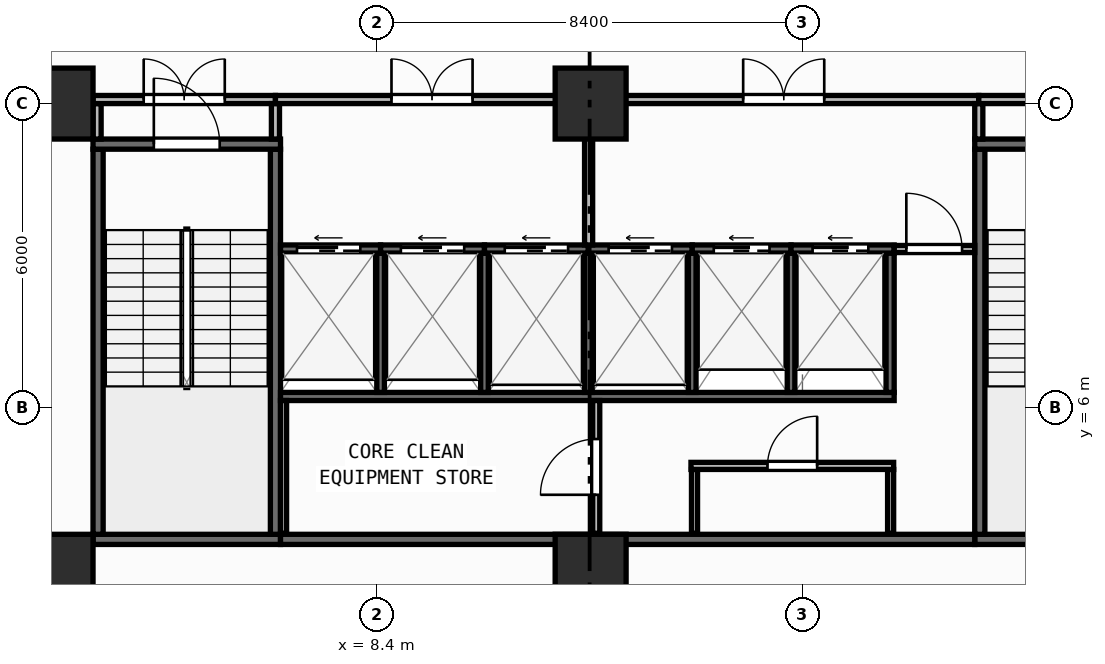
"""IFC4 building model, lengths in metres.
Left out: names, types, materials, properties, quantities, classifications, styles, units other than length and angle.
Written with IfcOpenShell. Run it as: python <this file> out.ifc"""

import sys

from ifc_helpers import new_model, si_unit, direction, frame, frame_2d, origin, origin_2d, place, context, subcontext, project, spatial, rectangle, extrude, element, fill, save


model = new_model("IFC4")
c1 = context("Model", 3, precision=1e-05, world=origin(), true_north=direction((0.0, 1.0)))
c2 = subcontext(c1, "Body", "Model", "MODEL_VIEW")
j1 = project(units=[si_unit("LENGTHUNIT", "METRE"), si_unit("PLANEANGLEUNIT", "RADIAN")], contexts=[c1])
p1 = place(None, origin())
s1 = spatial("IfcSite", under=j1, at=p1, CompositionType="ELEMENT")
p2 = place(p1, origin())
s2 = spatial("IfcBuilding", under=s1, at=p2, CompositionType="ELEMENT")
p3 = place(p2, origin())
s3 = spatial("IfcBuildingStorey", under=s2, at=p3, CompositionType="ELEMENT", Elevation=0.0)
for number, where, z_axis, x_axis in (
    (1, (2.1, 2.8, 0.0), (0.0, 0.0, 1.0), (1.0, 0.0, 0.0)),
    (2, (12.62, 2.8, 0.0), (0.0, 0.0, 1.0), (1.0, 0.0, 0.0)),
    (3, (2.1, 12.0, 0.0), (0.0, 0.0, 1.0), (1.0, 0.0, 0.0)),
    (4, (12.62, 12.0, 0.0), (0.0, 0.0, 1.0), (1.0, 0.0, 0.0)),
):
    element("IfcColumn", number, at=place(p3, frame(where, z_axis=z_axis, x_axis=x_axis)), inside=s3, PredefinedType="COLUMN", context=c2, shape_type="SweptSolid", body=[
        extrude(rectangle(XDim=1.4, YDim=1.4, at=origin_2d()), origin(), (0.0, 0.0, 1.0), 4.5),
    ])
p4 = place(p3, frame((2.8, 3.4, 0.0), z_axis=(0.0, 0.0, 1.0), x_axis=(1.0, 0.0, 0.0)))
e5 = element("IfcWall", 5, at=p4, inside=s3, PredefinedType="SHEAR", context=c2, shape_type="SweptSolid", body=[
    extrude(rectangle(XDim=3.7, YDim=0.2, at=frame_2d((1.85, 0.0))), origin(), (0.0, 0.0, 1.0), 4.25),
])
for number, where, z_axis, x_axis in (
    (6, (2.9, 3.5, 0.0), (0.0, 0.0, 1.0), (0.0, 1.0, 0.0)),
    (7, (6.4, 3.5, 0.0), (0.0, 0.0, 1.0), (0.0, 1.0, 0.0)),
):
    element("IfcWall", number, at=place(p3, frame(where, z_axis=z_axis, x_axis=x_axis)), inside=s3, PredefinedType="SHEAR", context=c2, shape_type="SweptSolid", body=[
        extrude(rectangle(XDim=7.6, YDim=0.2, at=frame_2d((3.8, 0.0))), origin(), (0.0, 0.0, 1.0), 4.25),
    ])
p5 = place(p3, frame((2.8, 11.2, 0.0), z_axis=(0.0, 0.0, 1.0), x_axis=(1.0, 0.0, 0.0)))
e8 = element("IfcWall", 8, at=p5, inside=s3, PredefinedType="SHEAR", context=c2, shape_type="SweptSolid", body=[
    extrude(rectangle(XDim=3.7, YDim=0.2, at=frame_2d((1.85, 0.0))), origin(), (0.0, 0.0, 1.0), 4.25),
])
p6 = place(p5, frame((1.2, 0.0, 0.0)))
e9 = element("IfcOpeningElement", 9, at=p6, cuts=e8, PredefinedType="OPENING", context=c2, shape_type="SweptSolid", body=[
    extrude(rectangle(XDim=1.3, YDim=2.15, at=frame_2d((0.65, 1.075))), frame((0.0, 0.11, 0.0), z_axis=(0.0, -1.0, 0.0), x_axis=(1.0, 0.0, 0.0)), (0.0, 0.0, 1.0), 0.22),
])
p7 = place(p3, frame((20.2, 3.4, 0.0), z_axis=(0.0, 0.0, 1.0), x_axis=(1.0, 0.0, 0.0)))
e10 = element("IfcWall", 10, at=p7, inside=s3, PredefinedType="SHEAR", context=c2, shape_type="SweptSolid", body=[
    extrude(rectangle(XDim=3.7, YDim=0.2, at=frame_2d((1.85, 0.0))), origin(), (0.0, 0.0, 1.0), 4.25),
])
p8 = place(p3, frame((20.3, 3.5, 0.0), z_axis=(0.0, 0.0, 1.0), x_axis=(0.0, 1.0, 0.0)))
e11 = element("IfcWall", 11, at=p8, inside=s3, PredefinedType="SHEAR", context=c2, shape_type="SweptSolid", body=[
    extrude(rectangle(XDim=7.6, YDim=0.2, at=frame_2d((3.8, 0.0))), origin(), (0.0, 0.0, 1.0), 4.25),
])
p9 = place(p3, frame((20.2, 11.2, 0.0), z_axis=(0.0, 0.0, 1.0), x_axis=(1.0, 0.0, 0.0)))
e12 = element("IfcWall", 12, at=p9, inside=s3, PredefinedType="SHEAR", context=c2, shape_type="SweptSolid", body=[
    extrude(rectangle(XDim=3.7, YDim=0.2, at=frame_2d((1.85, 0.0))), origin(), (0.0, 0.0, 1.0), 4.25),
])
p10 = place(p9, frame((1.2, 0.0, 0.0)))
e13 = element("IfcOpeningElement", 13, at=p10, cuts=e12, PredefinedType="OPENING", context=c2, shape_type="SweptSolid", body=[
    extrude(rectangle(XDim=1.3, YDim=2.15, at=frame_2d((0.65, 1.075))), frame((0.0, 0.11, 0.0), z_axis=(0.0, -1.0, 0.0), x_axis=(1.0, 0.0, 0.0)), (0.0, 0.0, 1.0), 0.22),
])
p11 = place(p3, frame((6.5, 3.4, 0.0), z_axis=(0.0, 0.0, 1.0), x_axis=(1.0, 0.0, 0.0)))
e14 = element("IfcWall", 14, at=p11, inside=s3, PredefinedType="SHEAR", context=c2, shape_type="SweptSolid", body=[
    extrude(rectangle(XDim=13.7, YDim=0.2, at=frame_2d((6.85, 0.0))), origin(), (0.0, 0.0, 1.0), 4.25),
])
p12 = place(p3, frame((6.5, 6.22, 0.0), z_axis=(0.0, 0.0, 1.0), x_axis=(1.0, 0.0, 0.0)))
e15 = element("IfcWall", 15, at=p12, inside=s3, PredefinedType="SHEAR", context=c2, shape_type="SweptSolid", body=[
    extrude(rectangle(XDim=12.11, YDim=0.16, at=frame_2d((6.055, 0.0))), origin(), (0.0, 0.0, 1.0), 4.25),
])
p13 = place(p3, frame((18.53, 6.3, 0.0), z_axis=(0.0, 0.0, 1.0), x_axis=(0.0, 1.0, 0.0)))
e16 = element("IfcWall", 16, at=p13, inside=s3, PredefinedType="SHEAR", context=c2, shape_type="SweptSolid", body=[
    extrude(rectangle(XDim=2.75, YDim=0.16, at=frame_2d((1.375, 0.0))), origin(), (0.0, 0.0, 1.0), 4.25),
])
for number, where, z_axis, x_axis in (
    (17, (8.475, 6.3, 0.0), (0.0, 0.0, 1.0), (0.0, 1.0, 0.0)),
    (18, (10.525, 6.3, 0.0), (0.0, 0.0, 1.0), (0.0, 1.0, 0.0)),
    (19, (12.575, 6.3, 0.0), (0.0, 0.0, 1.0), (0.0, 1.0, 0.0)),
    (20, (14.625, 6.3, 0.0), (0.0, 0.0, 1.0), (0.0, 1.0, 0.0)),
    (21, (16.575, 6.3, 0.0), (0.0, 0.0, 1.0), (0.0, 1.0, 0.0)),
):
    element("IfcWall", number, at=place(p3, frame(where, z_axis=z_axis, x_axis=x_axis)), inside=s3, PredefinedType="SHEAR", context=c2, shape_type="SweptSolid", body=[
        extrude(rectangle(XDim=2.75, YDim=0.15, at=frame_2d((1.375, 0.0))), origin(), (0.0, 0.0, 1.0), 4.25),
    ])
p14 = place(p3, frame((6.5, 9.13, 0.0), z_axis=(0.0, 0.0, 1.0), x_axis=(1.0, 0.0, 0.0)))
e22 = element("IfcWall", 22, at=p14, inside=s3, PredefinedType="SHEAR", context=c2, shape_type="SweptSolid", body=[
    extrude(rectangle(XDim=1.975, YDim=0.16, at=frame_2d((0.988, 0.0))), origin(), (0.0, 0.0, 1.0), 4.25),
])
p15 = place(p14, frame((0.325, 0.0, 0.0)))
e23 = element("IfcOpeningElement", 23, at=p15, cuts=e22, PredefinedType="OPENING", context=c2, shape_type="SweptSolid", body=[
    extrude(rectangle(XDim=1.25, YDim=2.15, at=frame_2d((0.625, 1.075))), frame((0.0, 0.09, 0.0), z_axis=(0.0, -1.0, 0.0), x_axis=(1.0, 0.0, 0.0)), (0.0, 0.0, 1.0), 0.18),
])
p16 = place(p3, frame((8.475, 9.13, 0.0), z_axis=(0.0, 0.0, 1.0), x_axis=(1.0, 0.0, 0.0)))
e24 = element("IfcWall", 24, at=p16, inside=s3, PredefinedType="SHEAR", context=c2, shape_type="SweptSolid", body=[
    extrude(rectangle(XDim=2.05, YDim=0.16, at=frame_2d((1.025, 0.0))), origin(), (0.0, 0.0, 1.0), 4.25),
])
p17 = place(p16, frame((0.4, 0.0, 0.0)))
e25 = element("IfcOpeningElement", 25, at=p17, cuts=e24, PredefinedType="OPENING", context=c2, shape_type="SweptSolid", body=[
    extrude(rectangle(XDim=1.25, YDim=2.15, at=frame_2d((0.625, 1.075))), frame((0.0, 0.09, 0.0), z_axis=(0.0, -1.0, 0.0), x_axis=(1.0, 0.0, 0.0)), (0.0, 0.0, 1.0), 0.18),
])
p18 = place(p3, frame((10.525, 9.13, 0.0), z_axis=(0.0, 0.0, 1.0), x_axis=(1.0, 0.0, 0.0)))
e26 = element("IfcWall", 26, at=p18, inside=s3, PredefinedType="SHEAR", context=c2, shape_type="SweptSolid", body=[
    extrude(rectangle(XDim=2.05, YDim=0.16, at=frame_2d((1.025, 0.0))), origin(), (0.0, 0.0, 1.0), 4.25),
])
p19 = place(p18, frame((0.4, 0.0, 0.0)))
e27 = element("IfcOpeningElement", 27, at=p19, cuts=e26, PredefinedType="OPENING", context=c2, shape_type="SweptSolid", body=[
    extrude(rectangle(XDim=1.25, YDim=2.15, at=frame_2d((0.625, 1.075))), frame((0.0, 0.09, 0.0), z_axis=(0.0, -1.0, 0.0), x_axis=(1.0, 0.0, 0.0)), (0.0, 0.0, 1.0), 0.18),
])
p20 = place(p3, frame((12.575, 9.13, 0.0), z_axis=(0.0, 0.0, 1.0), x_axis=(1.0, 0.0, 0.0)))
e28 = element("IfcWall", 28, at=p20, inside=s3, PredefinedType="SHEAR", context=c2, shape_type="SweptSolid", body=[
    extrude(rectangle(XDim=2.05, YDim=0.16, at=frame_2d((1.025, 0.0))), origin(), (0.0, 0.0, 1.0), 4.25),
])
p21 = place(p20, frame((0.4, 0.0, 0.0)))
e29 = element("IfcOpeningElement", 29, at=p21, cuts=e28, PredefinedType="OPENING", context=c2, shape_type="SweptSolid", body=[
    extrude(rectangle(XDim=1.25, YDim=2.15, at=frame_2d((0.625, 1.075))), frame((0.0, 0.09, 0.0), z_axis=(0.0, -1.0, 0.0), x_axis=(1.0, 0.0, 0.0)), (0.0, 0.0, 1.0), 0.18),
])
p22 = place(p3, frame((14.625, 9.13, 0.0), z_axis=(0.0, 0.0, 1.0), x_axis=(1.0, 0.0, 0.0)))
e30 = element("IfcWall", 30, at=p22, inside=s3, PredefinedType="SHEAR", context=c2, shape_type="SweptSolid", body=[
    extrude(rectangle(XDim=1.95, YDim=0.16, at=frame_2d((0.975, 0.0))), origin(), (0.0, 0.0, 1.0), 4.25),
])
p23 = place(p22, frame((0.425, 0.0, 0.0)))
e31 = element("IfcOpeningElement", 31, at=p23, cuts=e30, PredefinedType="OPENING", context=c2, shape_type="SweptSolid", body=[
    extrude(rectangle(XDim=1.1, YDim=2.15, at=frame_2d((0.55, 1.075))), frame((0.0, 0.09, 0.0), z_axis=(0.0, -1.0, 0.0), x_axis=(1.0, 0.0, 0.0)), (0.0, 0.0, 1.0), 0.18),
])
p24 = place(p3, frame((16.575, 9.13, 0.0), z_axis=(0.0, 0.0, 1.0), x_axis=(1.0, 0.0, 0.0)))
e32 = element("IfcWall", 32, at=p24, inside=s3, PredefinedType="SHEAR", context=c2, shape_type="SweptSolid", body=[
    extrude(rectangle(XDim=2.035, YDim=0.16, at=frame_2d((1.018, 0.0))), origin(), (0.0, 0.0, 1.0), 4.25),
])
p25 = place(p24, frame((0.425, 0.0, 0.0)))
e33 = element("IfcOpeningElement", 33, at=p25, cuts=e32, PredefinedType="OPENING", context=c2, shape_type="SweptSolid", body=[
    extrude(rectangle(XDim=1.1, YDim=2.15, at=frame_2d((0.55, 1.075))), frame((0.0, 0.09, 0.0), z_axis=(0.0, -1.0, 0.0), x_axis=(1.0, 0.0, 0.0)), (0.0, 0.0, 1.0), 0.18),
])
p26 = place(p3, frame((6.56, 3.52, 0.0), z_axis=(0.0, 0.0, 1.0), x_axis=(0.0, 1.0, 0.0)))
e34 = element("IfcWall", 34, at=p26, inside=s3, PredefinedType="PARTITIONING", context=c2, shape_type="SweptSolid", body=[
    extrude(rectangle(XDim=2.62, YDim=0.12, at=frame_2d((1.31, 0.0))), origin(), (0.0, 0.0, 1.0), 4.25),
])
p27 = place(p3, frame((12.73, 3.52, 0.0), z_axis=(0.0, 0.0, 1.0), x_axis=(0.0, 1.0, 0.0)))
e35 = element("IfcWall", 35, at=p27, inside=s3, PredefinedType="PARTITIONING", context=c2, shape_type="SweptSolid", body=[
    extrude(rectangle(XDim=2.62, YDim=0.14, at=frame_2d((1.31, 0.0))), origin(), (0.0, 0.0, 1.0), 4.25),
])
p28 = place(p27, frame((0.76, 0.0, 0.0)))
e36 = element("IfcOpeningElement", 36, at=p28, cuts=e35, PredefinedType="OPENING", context=c2, shape_type="SweptSolid", body=[
    extrude(rectangle(XDim=1.1, YDim=2.1, at=frame_2d((0.55, 1.05))), frame((0.0, 0.08, 0.0), z_axis=(0.0, -1.0, 0.0), x_axis=(1.0, 0.0, 0.0)), (0.0, 0.0, 1.0), 0.16),
])
for number, where, z_axis, x_axis in (
    (37, (14.67, 3.52, 0.0), (0.0, 0.0, 1.0), (0.0, 1.0, 0.0)),
    (38, (18.54, 3.52, 0.0), (0.0, 0.0, 1.0), (0.0, 1.0, 0.0)),
):
    element("IfcWall", number, at=place(p3, frame(where, z_axis=z_axis, x_axis=x_axis)), inside=s3, PredefinedType="PARTITIONING", context=c2, shape_type="SweptSolid", body=[
        extrude(rectangle(XDim=1.26, YDim=0.12, at=frame_2d((0.63, 0.0))), origin(), (0.0, 0.0, 1.0), 4.25),
    ])
p29 = place(p3, frame((14.6, 4.85, 0.0), z_axis=(0.0, 0.0, 1.0), x_axis=(1.0, 0.0, 0.0)))
e39 = element("IfcWall", 39, at=p29, inside=s3, PredefinedType="PARTITIONING", context=c2, shape_type="SweptSolid", body=[
    extrude(rectangle(XDim=4.0, YDim=0.14, at=frame_2d((2.0, 0.0))), origin(), (0.0, 0.0, 1.0), 4.25),
])
p30 = place(p29, frame((1.51, 0.0, 0.0)))
e40 = element("IfcOpeningElement", 40, at=p30, cuts=e39, PredefinedType="OPENING", context=c2, shape_type="SweptSolid", body=[
    extrude(rectangle(XDim=0.98, YDim=2.1, at=frame_2d((0.49, 1.05))), frame((0.0, 0.08, 0.0), z_axis=(0.0, -1.0, 0.0), x_axis=(1.0, 0.0, 0.0)), (0.0, 0.0, 1.0), 0.16),
])
p31 = place(p3, frame((18.61, 9.13, 0.0), z_axis=(0.0, 0.0, 1.0), x_axis=(1.0, 0.0, 0.0)))
e41 = element("IfcWall", 41, at=p31, inside=s3, PredefinedType="PARTITIONING", context=c2, shape_type="SweptSolid", body=[
    extrude(rectangle(XDim=1.59, YDim=0.14, at=frame_2d((0.795, 0.0))), origin(), (0.0, 0.0, 1.0), 4.25),
])
p32 = place(p31, frame((0.24, 0.0, 0.0)))
e42 = element("IfcOpeningElement", 42, at=p32, cuts=e41, PredefinedType="OPENING", context=c2, shape_type="SweptSolid", body=[
    extrude(rectangle(XDim=1.1, YDim=2.1, at=frame_2d((0.55, 1.05))), frame((0.0, 0.08, 0.0), z_axis=(0.0, -1.0, 0.0), x_axis=(1.0, 0.0, 0.0)), (0.0, 0.0, 1.0), 0.16),
])
p33 = place(p3, frame((2.88, 11.3, 0.0), z_axis=(0.0, 0.0, 1.0), x_axis=(0.0, 1.0, 0.0)))
e43 = element("IfcWall", 43, at=p33, inside=s3, PredefinedType="PARTITIONING", context=c2, shape_type="SweptSolid", body=[
    extrude(rectangle(XDim=0.7, YDim=0.16, at=frame_2d((0.35, 0.0))), origin(), (0.0, 0.0, 1.0), 4.25),
])
p34 = place(p3, frame((2.8, 12.08, 0.0), z_axis=(0.0, 0.0, 1.0), x_axis=(1.0, 0.0, 0.0)))
e44 = element("IfcWall", 44, at=p34, inside=s3, PredefinedType="PARTITIONING", context=c2, shape_type="SweptSolid", body=[
    extrude(rectangle(XDim=3.6, YDim=0.16, at=frame_2d((1.8, 0.0))), origin(), (0.0, 0.0, 1.0), 3.425),
])
p35 = place(p34, frame((1.0, 0.0, 0.0)))
e45 = element("IfcOpeningElement", 45, at=p35, cuts=e44, PredefinedType="OPENING", context=c2, shape_type="SweptSolid", body=[
    extrude(rectangle(XDim=1.6, YDim=2.05, at=frame_2d((0.8, 1.025))), frame((0.0, 0.09, 0.0), z_axis=(0.0, -1.0, 0.0), x_axis=(1.0, 0.0, 0.0)), (0.0, 0.0, 1.0), 0.18),
])
p36 = place(p3, frame((6.4, 11.3, 0.0), z_axis=(0.0, 0.0, 1.0), x_axis=(0.0, 1.0, 0.0)))
e46 = element("IfcWall", 46, at=p36, inside=s3, PredefinedType="PARTITIONING", context=c2, shape_type="SweptSolid", body=[
    extrude(rectangle(XDim=0.7, YDim=0.16, at=frame_2d((0.35, 0.0))), origin(), (0.0, 0.0, 1.0), 4.25),
])
p37 = place(p3, frame((6.4, 12.08, 0.0), z_axis=(0.0, 0.0, 1.0), x_axis=(1.0, 0.0, 0.0)))
e47 = element("IfcWall", 47, at=p37, inside=s3, PredefinedType="PARTITIONING", context=c2, shape_type="SweptSolid", body=[
    extrude(rectangle(XDim=6.18, YDim=0.16, at=frame_2d((3.09, 0.0))), origin(), (0.0, 0.0, 1.0), 3.425),
])
p38 = place(p37, frame((2.29, 0.0, 0.0)))
e48 = element("IfcOpeningElement", 48, at=p38, cuts=e47, PredefinedType="OPENING", context=c2, shape_type="SweptSolid", body=[
    extrude(rectangle(XDim=1.6, YDim=2.05, at=frame_2d((0.8, 1.025))), frame((0.0, 0.09, 0.0), z_axis=(0.0, -1.0, 0.0), x_axis=(1.0, 0.0, 0.0)), (0.0, 0.0, 1.0), 0.18),
])
p39 = place(p3, frame((12.58, 9.21, 0.0), z_axis=(0.0, 0.0, 1.0), x_axis=(0.0, 1.0, 0.0)))
e49 = element("IfcWall", 49, at=p39, inside=s3, PredefinedType="PARTITIONING", context=c2, shape_type="SweptSolid", body=[
    extrude(rectangle(XDim=2.79, YDim=0.16, at=frame_2d((1.395, 0.0))), origin(), (0.0, 0.0, 1.0), 4.25),
])
p40 = place(p3, frame((12.58, 12.08, 0.0), z_axis=(0.0, 0.0, 1.0), x_axis=(1.0, 0.0, 0.0)))
e50 = element("IfcWall", 50, at=p40, inside=s3, PredefinedType="PARTITIONING", context=c2, shape_type="SweptSolid", body=[
    extrude(rectangle(XDim=7.7, YDim=0.16, at=frame_2d((3.85, 0.0))), origin(), (0.0, 0.0, 1.0), 3.425),
])
p41 = place(p40, frame((3.05, 0.0, 0.0)))
e51 = element("IfcOpeningElement", 51, at=p41, cuts=e50, PredefinedType="OPENING", context=c2, shape_type="SweptSolid", body=[
    extrude(rectangle(XDim=1.6, YDim=2.05, at=frame_2d((0.8, 1.025))), frame((0.0, 0.09, 0.0), z_axis=(0.0, -1.0, 0.0), x_axis=(1.0, 0.0, 0.0)), (0.0, 0.0, 1.0), 0.18),
])
p42 = place(p3, frame((20.28, 11.3, 0.0), z_axis=(0.0, 0.0, 1.0), x_axis=(0.0, 1.0, 0.0)))
e52 = element("IfcWall", 52, at=p42, inside=s3, PredefinedType="PARTITIONING", context=c2, shape_type="SweptSolid", body=[
    extrude(rectangle(XDim=0.7, YDim=0.16, at=frame_2d((0.35, 0.0))), origin(), (0.0, 0.0, 1.0), 4.25),
])
p43 = place(p3, frame((20.28, 12.08, 0.0), z_axis=(0.0, 0.0, 1.0), x_axis=(1.0, 0.0, 0.0)))
e53 = element("IfcWall", 53, at=p43, inside=s3, PredefinedType="PARTITIONING", context=c2, shape_type="SweptSolid", body=[
    extrude(rectangle(XDim=3.62, YDim=0.16, at=frame_2d((1.81, 0.0))), origin(), (0.0, 0.0, 1.0), 3.425),
])
p44 = place(p43, frame((1.01, 0.0, 0.0)))
e54 = element("IfcOpeningElement", 54, at=p44, cuts=e53, PredefinedType="OPENING", context=c2, shape_type="SweptSolid", body=[
    extrude(rectangle(XDim=1.6, YDim=2.05, at=frame_2d((0.8, 1.025))), frame((0.0, 0.09, 0.0), z_axis=(0.0, -1.0, 0.0), x_axis=(1.0, 0.0, 0.0)), (0.0, 0.0, 1.0), 0.18),
])
p45 = place(p6, origin())
e55 = element("IfcDoor", 55, at=p45, inside=s3, OperationType="SINGLE_SWING_LEFT", PredefinedType="DOOR", context=c2, shape_type="SweptSolid", body=[
    extrude(rectangle(XDim=1.3, YDim=2.15, at=frame_2d((0.65, 1.075))), frame((0.0, 0.025, 0.0), z_axis=(0.0, -1.0, 0.0), x_axis=(1.0, 0.0, 0.0)), (0.0, 0.0, 1.0), 0.05),
])
fill(e9, e55)
p46 = place(p15, origin())
e56 = element("IfcDoor", 56, at=p46, inside=s3, OperationType="SLIDING_TO_LEFT", PredefinedType="DOOR", context=c2, shape_type="SweptSolid", body=[
    extrude(rectangle(XDim=1.25, YDim=2.15, at=frame_2d((0.625, 1.075))), frame((0.0, 0.025, 0.0), z_axis=(0.0, -1.0, 0.0), x_axis=(1.0, 0.0, 0.0)), (0.0, 0.0, 1.0), 0.05),
])
fill(e23, e56)
p47 = place(p17, origin())
e57 = element("IfcDoor", 57, at=p47, inside=s3, OperationType="SLIDING_TO_LEFT", PredefinedType="DOOR", context=c2, shape_type="SweptSolid", body=[
    extrude(rectangle(XDim=1.25, YDim=2.15, at=frame_2d((0.625, 1.075))), frame((0.0, 0.025, 0.0), z_axis=(0.0, -1.0, 0.0), x_axis=(1.0, 0.0, 0.0)), (0.0, 0.0, 1.0), 0.05),
])
fill(e25, e57)
p48 = place(p19, origin())
e58 = element("IfcDoor", 58, at=p48, inside=s3, OperationType="SLIDING_TO_LEFT", PredefinedType="DOOR", context=c2, shape_type="SweptSolid", body=[
    extrude(rectangle(XDim=1.25, YDim=2.15, at=frame_2d((0.625, 1.075))), frame((0.0, 0.025, 0.0), z_axis=(0.0, -1.0, 0.0), x_axis=(1.0, 0.0, 0.0)), (0.0, 0.0, 1.0), 0.05),
])
fill(e27, e58)
p49 = place(p21, origin())
e59 = element("IfcDoor", 59, at=p49, inside=s3, OperationType="SLIDING_TO_LEFT", PredefinedType="DOOR", context=c2, shape_type="SweptSolid", body=[
    extrude(rectangle(XDim=1.25, YDim=2.15, at=frame_2d((0.625, 1.075))), frame((0.0, 0.025, 0.0), z_axis=(0.0, -1.0, 0.0), x_axis=(1.0, 0.0, 0.0)), (0.0, 0.0, 1.0), 0.05),
])
fill(e29, e59)
p50 = place(p23, origin())
e60 = element("IfcDoor", 60, at=p50, inside=s3, OperationType="SLIDING_TO_LEFT", PredefinedType="DOOR", context=c2, shape_type="SweptSolid", body=[
    extrude(rectangle(XDim=1.1, YDim=2.15, at=frame_2d((0.55, 1.075))), frame((0.0, 0.025, 0.0), z_axis=(0.0, -1.0, 0.0), x_axis=(1.0, 0.0, 0.0)), (0.0, 0.0, 1.0), 0.05),
])
fill(e31, e60)
p51 = place(p25, origin())
e61 = element("IfcDoor", 61, at=p51, inside=s3, OperationType="SLIDING_TO_LEFT", PredefinedType="DOOR", context=c2, shape_type="SweptSolid", body=[
    extrude(rectangle(XDim=1.1, YDim=2.15, at=frame_2d((0.55, 1.075))), frame((0.0, 0.025, 0.0), z_axis=(0.0, -1.0, 0.0), x_axis=(1.0, 0.0, 0.0)), (0.0, 0.0, 1.0), 0.05),
])
fill(e33, e61)
p52 = place(p28, origin())
e62 = element("IfcDoor", 62, at=p52, inside=s3, OperationType="SINGLE_SWING_LEFT", PredefinedType="DOOR", context=c2, shape_type="SweptSolid", body=[
    extrude(rectangle(XDim=1.1, YDim=2.1, at=frame_2d((0.55, 1.05))), frame((0.0, 0.025, 0.0), z_axis=(0.0, -1.0, 0.0), x_axis=(1.0, 0.0, 0.0)), (0.0, 0.0, 1.0), 0.05),
])
fill(e36, e62)
p53 = place(p30, origin())
e63 = element("IfcDoor", 63, at=p53, inside=s3, OperationType="SINGLE_SWING_RIGHT", PredefinedType="DOOR", context=c2, shape_type="SweptSolid", body=[
    extrude(rectangle(XDim=0.98, YDim=2.1, at=frame_2d((0.49, 1.05))), frame((0.0, 0.025, 0.0), z_axis=(0.0, -1.0, 0.0), x_axis=(1.0, 0.0, 0.0)), (0.0, 0.0, 1.0), 0.05),
])
fill(e40, e63)
p54 = place(p32, origin())
e64 = element("IfcDoor", 64, at=p54, inside=s3, OperationType="SINGLE_SWING_LEFT", PredefinedType="DOOR", context=c2, shape_type="SweptSolid", body=[
    extrude(rectangle(XDim=1.1, YDim=2.1, at=frame_2d((0.55, 1.05))), frame((0.0, 0.025, 0.0), z_axis=(0.0, -1.0, 0.0), x_axis=(1.0, 0.0, 0.0)), (0.0, 0.0, 1.0), 0.05),
])
fill(e42, e64)
p55 = place(p35, origin())
e65 = element("IfcDoor", 65, at=p55, inside=s3, OperationType="DOUBLE_DOOR_SINGLE_SWING", PredefinedType="DOOR", context=c2, shape_type="SweptSolid", body=[
    extrude(rectangle(XDim=1.6, YDim=2.05, at=frame_2d((0.8, 1.025))), frame((0.0, 0.025, 0.0), z_axis=(0.0, -1.0, 0.0), x_axis=(1.0, 0.0, 0.0)), (0.0, 0.0, 1.0), 0.05),
])
fill(e45, e65)
p56 = place(p38, origin())
e66 = element("IfcDoor", 66, at=p56, inside=s3, OperationType="DOUBLE_DOOR_SINGLE_SWING", PredefinedType="DOOR", context=c2, shape_type="SweptSolid", body=[
    extrude(rectangle(XDim=1.6, YDim=2.05, at=frame_2d((0.8, 1.025))), frame((0.0, 0.025, 0.0), z_axis=(0.0, -1.0, 0.0), x_axis=(1.0, 0.0, 0.0)), (0.0, 0.0, 1.0), 0.05),
])
fill(e48, e66)
p57 = place(p41, origin())
e67 = element("IfcDoor", 67, at=p57, inside=s3, OperationType="DOUBLE_DOOR_SINGLE_SWING", PredefinedType="DOOR", context=c2, shape_type="SweptSolid", body=[
    extrude(rectangle(XDim=1.6, YDim=2.05, at=frame_2d((0.8, 1.025))), frame((0.0, 0.025, 0.0), z_axis=(0.0, -1.0, 0.0), x_axis=(1.0, 0.0, 0.0)), (0.0, 0.0, 1.0), 0.05),
])
fill(e51, e67)
save(model, sys.argv[1])
